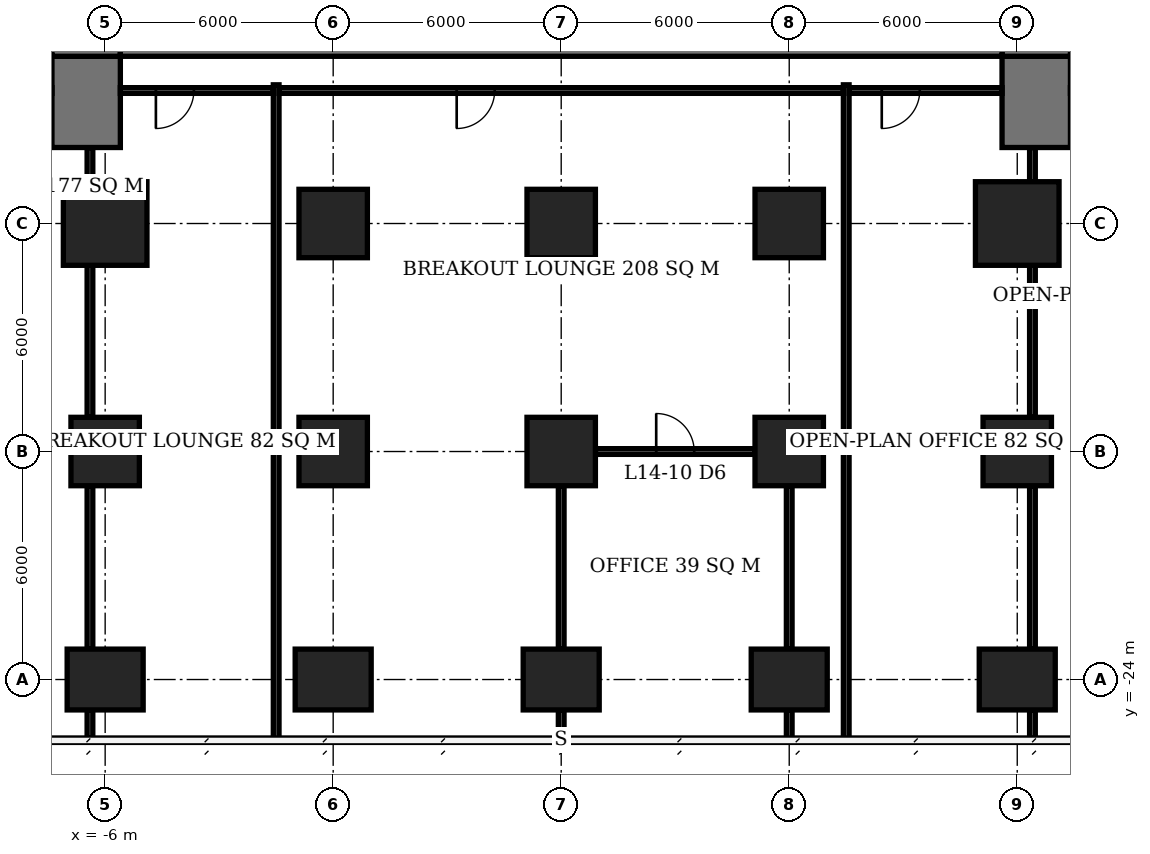
"""IFC4 building model, lengths in metres.
Left out: names, types, materials, properties, quantities, classifications, styles, units other than length and angle.
Written with IfcOpenShell. Run it as: python <this file> out.ifc"""

import sys

from ifc_helpers import new_model, si_unit, direction, frame, frame_2d, origin, origin_2d, place, context, subcontext, project, spatial, rectangle, extrude, element, fill, save


model = new_model("IFC4")
c1 = context("Model", 3, precision=1e-05, world=origin(), true_north=direction((0.0, 1.0)))
c2 = subcontext(c1, "Body", "Model", "MODEL_VIEW")
j1 = project(units=[si_unit("LENGTHUNIT", "METRE"), si_unit("PLANEANGLEUNIT", "RADIAN")], contexts=[c1])
p1 = place(None, origin())
s1 = spatial("IfcSite", under=j1, at=p1, CompositionType="ELEMENT")
p2 = place(p1, origin())
s2 = spatial("IfcBuilding", under=s1, at=p2, CompositionType="ELEMENT")
p3 = place(p2, frame((0.0, 0.0, 61.1)))
s3 = spatial("IfcBuildingStorey", under=s2, at=p3, CompositionType="ELEMENT", Elevation=61.1)
p4 = place(p3, frame((-6.0, -24.0, 0.0), z_axis=(0.0, 0.0, 1.0), x_axis=(1.0, 0.0, 0.0)))
e1 = element("IfcColumn", 1, at=p4, inside=s3, PredefinedType="COLUMN", context=c2, shape_type="SweptSolid", body=[
    extrude(rectangle(XDim=2.0, YDim=1.6, at=origin_2d()), origin(), (0.0, 0.0, 1.0), 3.9),
])
p5 = place(p3, frame((-6.0, -18.0, 0.0), z_axis=(0.0, 0.0, 1.0), x_axis=(1.0, 0.0, 0.0)))
e2 = element("IfcColumn", 2, at=p5, inside=s3, PredefinedType="COLUMN", context=c2, shape_type="SweptSolid", body=[
    extrude(rectangle(XDim=1.8, YDim=1.8, at=origin_2d()), origin(), (0.0, 0.0, 1.0), 3.9),
])
p6 = place(p3, frame((-6.0, -12.0, 0.0), z_axis=(0.0, 0.0, 1.0), x_axis=(1.0, 0.0, 0.0)))
e3 = element("IfcColumn", 3, at=p6, inside=s3, PredefinedType="COLUMN", context=c2, shape_type="SweptSolid", body=[
    extrude(rectangle(XDim=2.2, YDim=2.2, at=origin_2d()), origin(), (0.0, 0.0, 1.0), 3.9),
])
p7 = place(p3, frame((0.0, -24.0, 0.0), z_axis=(0.0, 0.0, 1.0), x_axis=(1.0, 0.0, 0.0)))
e4 = element("IfcColumn", 4, at=p7, inside=s3, PredefinedType="COLUMN", context=c2, shape_type="SweptSolid", body=[
    extrude(rectangle(XDim=2.0, YDim=1.6, at=origin_2d()), origin(), (0.0, 0.0, 1.0), 3.9),
])
for number, where, z_axis, x_axis in (
    (5, (0.0, -18.0, 0.0), (0.0, 0.0, 1.0), (1.0, 0.0, 0.0)),
    (6, (0.0, -12.0, 0.0), (0.0, 0.0, 1.0), (1.0, 0.0, 0.0)),
):
    element("IfcColumn", number, at=place(p3, frame(where, z_axis=z_axis, x_axis=x_axis)), inside=s3, PredefinedType="COLUMN", context=c2, shape_type="SweptSolid", body=[
        extrude(rectangle(XDim=1.8, YDim=1.8, at=origin_2d()), origin(), (0.0, 0.0, 1.0), 3.9),
    ])
p8 = place(p3, frame((6.0, -24.0, 0.0), z_axis=(0.0, 0.0, 1.0), x_axis=(1.0, 0.0, 0.0)))
e7 = element("IfcColumn", 7, at=p8, inside=s3, PredefinedType="COLUMN", context=c2, shape_type="SweptSolid", body=[
    extrude(rectangle(XDim=2.0, YDim=1.6, at=origin_2d()), origin(), (0.0, 0.0, 1.0), 3.9),
])
for number, where, z_axis, x_axis in (
    (8, (6.0, -18.0, 0.0), (0.0, 0.0, 1.0), (1.0, 0.0, 0.0)),
    (9, (6.0, -12.0, 0.0), (0.0, 0.0, 1.0), (1.0, 0.0, 0.0)),
):
    element("IfcColumn", number, at=place(p3, frame(where, z_axis=z_axis, x_axis=x_axis)), inside=s3, PredefinedType="COLUMN", context=c2, shape_type="SweptSolid", body=[
        extrude(rectangle(XDim=1.8, YDim=1.8, at=origin_2d()), origin(), (0.0, 0.0, 1.0), 3.9),
    ])
p9 = place(p3, frame((12.0, -24.0, 0.0), z_axis=(0.0, 0.0, 1.0), x_axis=(1.0, 0.0, 0.0)))
e10 = element("IfcColumn", 10, at=p9, inside=s3, PredefinedType="COLUMN", context=c2, shape_type="SweptSolid", body=[
    extrude(rectangle(XDim=2.0, YDim=1.6, at=origin_2d()), origin(), (0.0, 0.0, 1.0), 3.9),
])
for number, where, z_axis, x_axis in (
    (11, (12.0, -18.0, 0.0), (0.0, 0.0, 1.0), (1.0, 0.0, 0.0)),
    (12, (12.0, -12.0, 0.0), (0.0, 0.0, 1.0), (1.0, 0.0, 0.0)),
):
    element("IfcColumn", number, at=place(p3, frame(where, z_axis=z_axis, x_axis=x_axis)), inside=s3, PredefinedType="COLUMN", context=c2, shape_type="SweptSolid", body=[
        extrude(rectangle(XDim=1.8, YDim=1.8, at=origin_2d()), origin(), (0.0, 0.0, 1.0), 3.9),
    ])
p10 = place(p3, frame((18.0, -24.0, 0.0), z_axis=(0.0, 0.0, 1.0), x_axis=(1.0, 0.0, 0.0)))
e13 = element("IfcColumn", 13, at=p10, inside=s3, PredefinedType="COLUMN", context=c2, shape_type="SweptSolid", body=[
    extrude(rectangle(XDim=2.0, YDim=1.6, at=origin_2d()), origin(), (0.0, 0.0, 1.0), 3.9),
])
p11 = place(p3, frame((18.0, -18.0, 0.0), z_axis=(0.0, 0.0, 1.0), x_axis=(1.0, 0.0, 0.0)))
e14 = element("IfcColumn", 14, at=p11, inside=s3, PredefinedType="COLUMN", context=c2, shape_type="SweptSolid", body=[
    extrude(rectangle(XDim=1.8, YDim=1.8, at=origin_2d()), origin(), (0.0, 0.0, 1.0), 3.9),
])
p12 = place(p3, frame((18.0, -12.0, 0.0), z_axis=(0.0, 0.0, 1.0), x_axis=(1.0, 0.0, 0.0)))
e15 = element("IfcColumn", 15, at=p12, inside=s3, PredefinedType="COLUMN", context=c2, shape_type="SweptSolid", body=[
    extrude(rectangle(XDim=2.2, YDim=2.2, at=origin_2d()), origin(), (0.0, 0.0, 1.0), 3.9),
])
p13 = place(p3, frame((-5.6, -6.6, 0.0), z_axis=(0.0, 0.0, 1.0), x_axis=(1.0, 0.0, 0.0)))
e16 = element("IfcWall", 16, at=p13, inside=s3, PredefinedType="SHEAR", context=c2, shape_type="SweptSolid", body=[
    extrude(rectangle(XDim=23.2, YDim=2.0, at=frame_2d((11.6, 0.0))), origin(), (0.0, 0.0, 1.0), 3.9),
])
p14 = place(p3, frame((-6.5, -7.6, 0.0), z_axis=(0.0, 0.0, 1.0), x_axis=(0.0, 1.0, 0.0)))
e17 = element("IfcWall", 17, at=p14, inside=s3, PredefinedType="SHEAR", context=c2, shape_type="SweptSolid", body=[
    extrude(rectangle(XDim=21.2, YDim=1.8, at=frame_2d((10.6, 0.0))), origin(), (0.0, 0.0, 1.0), 3.9),
])
p15 = place(p14, frame((7.8, 0.0, 0.0)))
e18 = element("IfcOpeningElement", 18, at=p15, cuts=e17, PredefinedType="OPENING", context=c2, shape_type="SweptSolid", body=[
    extrude(rectangle(XDim=1.8, YDim=2.4, at=frame_2d((0.9, 1.2))), frame((0.0, 0.91, 0.0), z_axis=(0.0, -1.0, 0.0), x_axis=(1.0, 0.0, 0.0)), (0.0, 0.0, 1.0), 1.82),
])
p16 = place(p3, frame((18.5, -7.6, 0.0), z_axis=(0.0, 0.0, 1.0), x_axis=(0.0, 1.0, 0.0)))
e19 = element("IfcWall", 19, at=p16, inside=s3, PredefinedType="SHEAR", context=c2, shape_type="SweptSolid", body=[
    extrude(rectangle(XDim=21.2, YDim=1.8, at=frame_2d((10.6, 0.0))), origin(), (0.0, 0.0, 1.0), 3.9),
])
p17 = place(p16, frame((9.2, 0.0, 0.0)))
e20 = element("IfcOpeningElement", 20, at=p17, cuts=e19, PredefinedType="OPENING", context=c2, shape_type="SweptSolid", body=[
    extrude(rectangle(XDim=1.8, YDim=2.4, at=frame_2d((0.9, 1.2))), frame((0.0, 0.91, 0.0), z_axis=(0.0, -1.0, 0.0), x_axis=(1.0, 0.0, 0.0)), (0.0, 0.0, 1.0), 1.82),
])
for number, where, z_axis, x_axis in (
    (21, (-6.5, -10.0, 0.0), (0.0, 0.0, 1.0), (0.0, 1.0, 0.0)),
    (22, (18.5, -10.0, 0.0), (0.0, 0.0, 1.0), (0.0, 1.0, 0.0)),
):
    element("IfcWall", number, at=place(p3, frame(where, z_axis=z_axis, x_axis=x_axis)), inside=s3, PredefinedType="SHEAR", context=c2, shape_type="SweptSolid", body=[
        extrude(rectangle(XDim=2.4, YDim=1.8, at=frame_2d((1.2, 0.0))), origin(), (0.0, 0.0, 1.0), 3.9),
    ])
p18 = place(p3, frame((6.9, -18.0, 0.0), z_axis=(0.0, 0.0, 1.0), x_axis=(1.0, 0.0, 0.0)))
e23 = element("IfcWall", 23, at=p18, inside=s3, PredefinedType="PARTITIONING", context=c2, shape_type="SweptSolid", body=[
    extrude(rectangle(XDim=4.2, YDim=0.15, at=frame_2d((2.1, 0.0))), origin(), (0.0, 0.0, 1.0), 3.65),
])
p19 = place(p18, frame((1.6, 0.0, 0.0)))
e24 = element("IfcOpeningElement", 24, at=p19, cuts=e23, PredefinedType="OPENING", context=c2, shape_type="SweptSolid", body=[
    extrude(rectangle(XDim=1.0, YDim=2.1, at=frame_2d((0.5, 1.05))), frame((0.0, 0.085, 0.0), z_axis=(0.0, -1.0, 0.0), x_axis=(1.0, 0.0, 0.0)), (0.0, 0.0, 1.0), 0.17),
])
p20 = place(p3, frame((6.0, -25.55, 0.0), z_axis=(0.0, 0.0, 1.0), x_axis=(0.0, 1.0, 0.0)))
e25 = element("IfcWall", 25, at=p20, inside=s3, PredefinedType="PARTITIONING", context=c2, shape_type="SweptSolid", body=[
    extrude(rectangle(XDim=0.75, YDim=0.15, at=frame_2d((0.375, 0.0))), origin(), (0.0, 0.0, 1.0), 3.65),
])
p21 = place(p3, frame((6.0, -23.2, 0.0), z_axis=(0.0, 0.0, 1.0), x_axis=(0.0, 1.0, 0.0)))
e26 = element("IfcWall", 26, at=p21, inside=s3, PredefinedType="PARTITIONING", context=c2, shape_type="SweptSolid", body=[
    extrude(rectangle(XDim=4.3, YDim=0.15, at=frame_2d((2.15, 0.0))), origin(), (0.0, 0.0, 1.0), 3.65),
])
p22 = place(p3, frame((12.0, -25.6, 0.0), z_axis=(0.0, 0.0, 1.0), x_axis=(0.0, 1.0, 0.0)))
e27 = element("IfcWall", 27, at=p22, inside=s3, PredefinedType="PARTITIONING", context=c2, shape_type="SweptSolid", body=[
    extrude(rectangle(XDim=0.8, YDim=0.15, at=frame_2d((0.4, 0.0))), origin(), (0.0, 0.0, 1.0), 3.65),
])
p23 = place(p3, frame((12.0, -23.2, 0.0), z_axis=(0.0, 0.0, 1.0), x_axis=(0.0, 1.0, 0.0)))
e28 = element("IfcWall", 28, at=p23, inside=s3, PredefinedType="PARTITIONING", context=c2, shape_type="SweptSolid", body=[
    extrude(rectangle(XDim=4.3, YDim=0.15, at=frame_2d((2.15, 0.0))), origin(), (0.0, 0.0, 1.0), 3.65),
])
p24 = place(p3, frame((-6.4, -25.55, 0.0), z_axis=(0.0, 0.0, 1.0), x_axis=(0.0, 1.0, 0.0)))
e29 = element("IfcWall", 29, at=p24, inside=s3, PredefinedType="PARTITIONING", context=c2, shape_type="SweptSolid", body=[
    extrude(rectangle(XDim=0.75, YDim=0.15, at=frame_2d((0.375, 0.0))), origin(), (0.0, 0.0, 1.0), 3.65),
])
p25 = place(p3, frame((-6.4, -23.2, 0.0), z_axis=(0.0, 0.0, 1.0), x_axis=(0.0, 1.0, 0.0)))
e30 = element("IfcWall", 30, at=p25, inside=s3, PredefinedType="PARTITIONING", context=c2, shape_type="SweptSolid", body=[
    extrude(rectangle(XDim=4.3, YDim=0.15, at=frame_2d((2.15, 0.0))), origin(), (0.0, 0.0, 1.0), 3.65),
])
p26 = place(p3, frame((-6.4, -17.1, 0.0), z_axis=(0.0, 0.0, 1.0), x_axis=(0.0, 1.0, 0.0)))
e31 = element("IfcWall", 31, at=p26, inside=s3, PredefinedType="PARTITIONING", context=c2, shape_type="SweptSolid", body=[
    extrude(rectangle(XDim=4.0, YDim=0.15, at=frame_2d((2.0, 0.0))), origin(), (0.0, 0.0, 1.0), 3.65),
])
p27 = place(p3, frame((-6.4, -10.9, 0.0), z_axis=(0.0, 0.0, 1.0), x_axis=(0.0, 1.0, 0.0)))
e32 = element("IfcWall", 32, at=p27, inside=s3, PredefinedType="PARTITIONING", context=c2, shape_type="SweptSolid", body=[
    extrude(rectangle(XDim=0.9, YDim=0.15, at=frame_2d((0.45, 0.0))), origin(), (0.0, 0.0, 1.0), 3.65),
])
p28 = place(p3, frame((-1.575, -8.5, 0.0), z_axis=(0.0, 0.0, 1.0), x_axis=(-1.0, 0.0, 0.0)))
e33 = element("IfcWall", 33, at=p28, inside=s3, PredefinedType="PARTITIONING", context=c2, shape_type="SweptSolid", body=[
    extrude(rectangle(XDim=4.025, YDim=0.15, at=frame_2d((2.013, 0.0))), origin(), (0.0, 0.0, 1.0), 3.65),
])
p29 = place(p28, frame((2.09, 0.0, 0.0)))
e34 = element("IfcOpeningElement", 34, at=p29, cuts=e33, PredefinedType="OPENING", context=c2, shape_type="SweptSolid", body=[
    extrude(rectangle(XDim=1.0, YDim=2.1, at=frame_2d((0.5, 1.05))), frame((0.0, 0.085, 0.0), z_axis=(0.0, -1.0, 0.0), x_axis=(1.0, 0.0, 0.0)), (0.0, 0.0, 1.0), 0.17),
])
p30 = place(p3, frame((-1.5, -25.6, 0.0), z_axis=(0.0, 0.0, 1.0), x_axis=(0.0, 1.0, 0.0)))
e35 = element("IfcWall", 35, at=p30, inside=s3, PredefinedType="PARTITIONING", context=c2, shape_type="SweptSolid", body=[
    extrude(rectangle(XDim=17.25, YDim=0.15, at=frame_2d((8.625, 0.0))), origin(), (0.0, 0.0, 1.0), 3.65),
])
p31 = place(p3, frame((13.425, -8.5, 0.0), z_axis=(0.0, 0.0, 1.0), x_axis=(-1.0, 0.0, 0.0)))
e36 = element("IfcWall", 36, at=p31, inside=s3, PredefinedType="PARTITIONING", context=c2, shape_type="SweptSolid", body=[
    extrude(rectangle(XDim=14.85, YDim=0.15, at=frame_2d((7.425, 0.0))), origin(), (0.0, 0.0, 1.0), 3.65),
])
p32 = place(p31, frame((9.175, 0.0, 0.0)))
e37 = element("IfcOpeningElement", 37, at=p32, cuts=e36, PredefinedType="OPENING", context=c2, shape_type="SweptSolid", body=[
    extrude(rectangle(XDim=1.0, YDim=2.1, at=frame_2d((0.5, 1.05))), frame((0.0, 0.085, 0.0), z_axis=(0.0, -1.0, 0.0), x_axis=(1.0, 0.0, 0.0)), (0.0, 0.0, 1.0), 0.17),
])
p33 = place(p3, frame((13.5, -25.6, 0.0), z_axis=(0.0, 0.0, 1.0), x_axis=(0.0, 1.0, 0.0)))
e38 = element("IfcWall", 38, at=p33, inside=s3, PredefinedType="PARTITIONING", context=c2, shape_type="SweptSolid", body=[
    extrude(rectangle(XDim=17.25, YDim=0.15, at=frame_2d((8.625, 0.0))), origin(), (0.0, 0.0, 1.0), 3.65),
])
p34 = place(p3, frame((17.6, -8.5, 0.0), z_axis=(0.0, 0.0, 1.0), x_axis=(-1.0, 0.0, 0.0)))
e39 = element("IfcWall", 39, at=p34, inside=s3, PredefinedType="PARTITIONING", context=c2, shape_type="SweptSolid", body=[
    extrude(rectangle(XDim=4.025, YDim=0.15, at=frame_2d((2.013, 0.0))), origin(), (0.0, 0.0, 1.0), 3.65),
])
p35 = place(p34, frame((2.165, 0.0, 0.0)))
e40 = element("IfcOpeningElement", 40, at=p35, cuts=e39, PredefinedType="OPENING", context=c2, shape_type="SweptSolid", body=[
    extrude(rectangle(XDim=1.0, YDim=2.1, at=frame_2d((0.5, 1.05))), frame((0.0, 0.085, 0.0), z_axis=(0.0, -1.0, 0.0), x_axis=(1.0, 0.0, 0.0)), (0.0, 0.0, 1.0), 0.17),
])
p36 = place(p3, frame((18.4, -25.55, 0.0), z_axis=(0.0, 0.0, 1.0), x_axis=(0.0, 1.0, 0.0)))
e41 = element("IfcWall", 41, at=p36, inside=s3, PredefinedType="PARTITIONING", context=c2, shape_type="SweptSolid", body=[
    extrude(rectangle(XDim=0.75, YDim=0.15, at=frame_2d((0.375, 0.0))), origin(), (0.0, 0.0, 1.0), 3.65),
])
p37 = place(p3, frame((18.4, -23.2, 0.0), z_axis=(0.0, 0.0, 1.0), x_axis=(0.0, 1.0, 0.0)))
e42 = element("IfcWall", 42, at=p37, inside=s3, PredefinedType="PARTITIONING", context=c2, shape_type="SweptSolid", body=[
    extrude(rectangle(XDim=4.3, YDim=0.15, at=frame_2d((2.15, 0.0))), origin(), (0.0, 0.0, 1.0), 3.65),
])
p38 = place(p3, frame((18.4, -17.1, 0.0), z_axis=(0.0, 0.0, 1.0), x_axis=(0.0, 1.0, 0.0)))
e43 = element("IfcWall", 43, at=p38, inside=s3, PredefinedType="PARTITIONING", context=c2, shape_type="SweptSolid", body=[
    extrude(rectangle(XDim=4.0, YDim=0.15, at=frame_2d((2.0, 0.0))), origin(), (0.0, 0.0, 1.0), 3.65),
])
p39 = place(p3, frame((18.4, -10.9, 0.0), z_axis=(0.0, 0.0, 1.0), x_axis=(0.0, 1.0, 0.0)))
e44 = element("IfcWall", 44, at=p39, inside=s3, PredefinedType="PARTITIONING", context=c2, shape_type="SweptSolid", body=[
    extrude(rectangle(XDim=0.9, YDim=0.15, at=frame_2d((0.45, 0.0))), origin(), (0.0, 0.0, 1.0), 3.65),
])
p40 = place(p3, frame((19.4, -8.5, 0.0), z_axis=(0.0, 0.0, 1.0), x_axis=(1.0, 0.0, 0.0)))
e45 = element("IfcWall", 45, at=p40, inside=s3, PredefinedType="PARTITIONING", context=c2, shape_type="SweptSolid", body=[
    extrude(rectangle(XDim=1.175, YDim=0.15, at=frame_2d((0.587, 0.0))), origin(), (0.0, 0.0, 1.0), 3.65),
])
p41 = place(p19, origin())
e46 = element("IfcDoor", 46, at=p41, inside=s3, OperationType="SINGLE_SWING_LEFT", PredefinedType="DOOR", context=c2, shape_type="SweptSolid", body=[
    extrude(rectangle(XDim=1.0, YDim=2.1, at=frame_2d((0.5, 1.05))), frame((0.0, 0.025, 0.0), z_axis=(0.0, -1.0, 0.0), x_axis=(1.0, 0.0, 0.0)), (0.0, 0.0, 1.0), 0.05),
])
fill(e24, e46)
p42 = place(p29, origin())
e47 = element("IfcDoor", 47, at=p42, inside=s3, OperationType="SINGLE_SWING_RIGHT", PredefinedType="DOOR", context=c2, shape_type="SweptSolid", body=[
    extrude(rectangle(XDim=1.0, YDim=2.1, at=frame_2d((0.5, 1.05))), frame((0.0, 0.025, 0.0), z_axis=(0.0, -1.0, 0.0), x_axis=(1.0, 0.0, 0.0)), (0.0, 0.0, 1.0), 0.05),
])
fill(e34, e47)
p43 = place(p35, origin())
e48 = element("IfcDoor", 48, at=p43, inside=s3, OperationType="SINGLE_SWING_RIGHT", PredefinedType="DOOR", context=c2, shape_type="SweptSolid", body=[
    extrude(rectangle(XDim=1.0, YDim=2.1, at=frame_2d((0.5, 1.05))), frame((0.0, 0.025, 0.0), z_axis=(0.0, -1.0, 0.0), x_axis=(1.0, 0.0, 0.0)), (0.0, 0.0, 1.0), 0.05),
])
fill(e40, e48)
p44 = place(p32, origin())
e49 = element("IfcDoor", 49, at=p44, inside=s3, OperationType="SINGLE_SWING_RIGHT", PredefinedType="DOOR", context=c2, shape_type="SweptSolid", body=[
    extrude(rectangle(XDim=1.0, YDim=2.1, at=frame_2d((0.5, 1.05))), frame((0.0, 0.025, 0.0), z_axis=(0.0, -1.0, 0.0), x_axis=(1.0, 0.0, 0.0)), (0.0, 0.0, 1.0), 0.05),
])
fill(e37, e49)
save(model, sys.argv[1])
